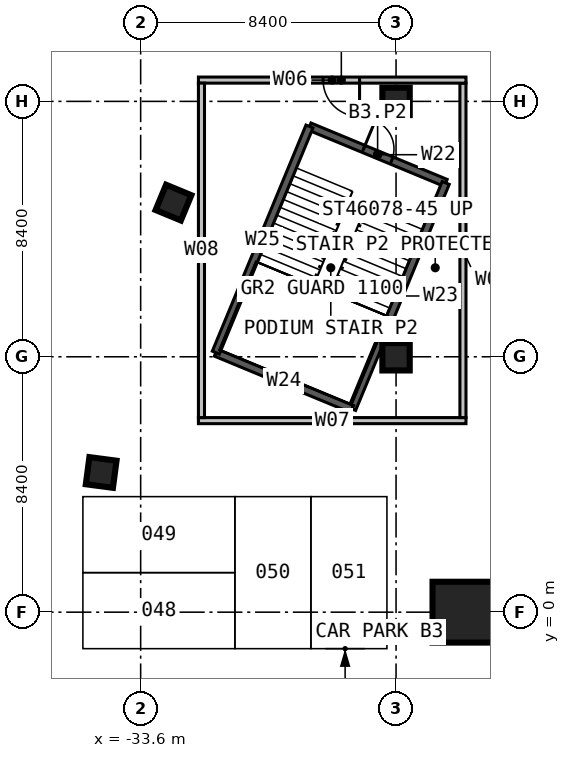
"""IFC4 building model, lengths in metres.
Left out: names, types, materials, properties, quantities, classifications, styles, units other than length and angle.
Written with IfcOpenShell. Run it as: python <this file> out.ifc"""

import sys

from ifc_helpers import new_model, si_unit, direction, frame, frame_2d, origin, origin_2d, place, context, subcontext, project, spatial, rectangle, hollow_rectangle, extrude, element, fill, save


model = new_model("IFC4")
c1 = context("Model", 3, precision=1e-05, world=origin(), true_north=direction((0.0, 1.0)))
c2 = subcontext(c1, "Body", "Model", "MODEL_VIEW")
j1 = project(units=[si_unit("LENGTHUNIT", "METRE"), si_unit("PLANEANGLEUNIT", "RADIAN")], contexts=[c1])
p1 = place(None, origin())
s1 = spatial("IfcSite", under=j1, at=p1, CompositionType="ELEMENT")
p2 = place(p1, origin())
s2 = spatial("IfcBuilding", under=s1, at=p2, CompositionType="ELEMENT")
p3 = place(p2, frame((0.0, 0.0, -13.5)))
s3 = spatial("IfcBuildingStorey", under=s2, at=p3, CompositionType="ELEMENT", Elevation=-13.5)
for number, where, z_axis, x_axis in (
    (1, (-25.2, 8.4, 0.0), (0.0, 0.0, 1.0), (1.0, 0.0, 0.0)),
    (2, (-25.2, 16.8, 0.0), (0.0, 0.0, 1.0), (1.0, 0.0, 0.0)),
    (3, (-32.521, 13.47, 0.0), (0.0, 0.0, 1.0), (-0.924, 0.383, 0.0)),
    (4, (-34.899, 4.594, 0.0), (0.0, 0.0, 1.0), (-0.991, 0.131, 0.0)),
):
    element("IfcColumn", number, at=place(p3, frame(where, z_axis=z_axis, x_axis=x_axis)), inside=s3, PredefinedType="COLUMN", context=c2, shape_type="SweptSolid", body=[
        extrude(rectangle(XDim=0.9, YDim=0.9, at=origin_2d()), origin(), (0.0, 0.0, 1.0), 4.5),
    ])
p4 = place(p3, frame((-23.0, 0.0, 0.0), z_axis=(0.0, 0.0, 1.0), x_axis=(-1.0, 0.0, 0.0)))
e5 = element("IfcColumn", 5, at=p4, inside=s3, PredefinedType="COLUMN", context=c2, shape_type="SweptSolid", body=[
    extrude(hollow_rectangle(XDim=2.0, YDim=2.0, WallThickness=0.24, at=origin_2d()), origin(), (0.0, 0.0, 1.0), 4.5),
])
p5 = place(p3, frame((-28.047, 15.974, 0.0), z_axis=(0.0, 0.0, 1.0), x_axis=(0.923862828997, -0.382723755727, 0.0)))
e6 = element("IfcWall", 6, at=p5, inside=s3, PredefinedType="SOLIDWALL", context=c2, shape_type="SweptSolid", body=[
    extrude(rectangle(XDim=4.85, YDim=0.25, at=frame_2d((2.425, 0.0))), origin(), (0.0, 0.0, 1.0), 4.5),
])
p6 = place(p5, frame((1.925, 0.0, 0.0)))
e7 = element("IfcOpeningElement", 7, at=p6, cuts=e6, PredefinedType="OPENING", context=c2, shape_type="SweptSolid", body=[
    extrude(rectangle(XDim=1.0, YDim=2.2, at=frame_2d((0.5, 1.1))), frame((0.0, 0.135, 0.0), z_axis=(0.0, -1.0, 0.0), x_axis=(1.0, 0.0, 0.0)), (0.0, 0.0, 1.0), 0.27),
])
p7 = place(p3, frame((-23.566, 14.118, 0.0), z_axis=(0.0, 0.0, 1.0), x_axis=(-0.382689294869, -0.923877104161, 0.0)))
e8 = element("IfcWall", 8, at=p7, inside=s3, PredefinedType="SOLIDWALL", context=c2, shape_type="SweptSolid", body=[
    extrude(rectangle(XDim=8.05, YDim=0.25, at=frame_2d((4.025, 0.0))), origin(), (0.0, 0.0, 1.0), 4.5),
])
p8 = place(p3, frame((-26.647, 6.681, 0.0), z_axis=(0.0, 0.0, 1.0), x_axis=(-0.923880627248, 0.382680789426, 0.0)))
e9 = element("IfcWall", 9, at=p8, inside=s3, PredefinedType="SOLIDWALL", context=c2, shape_type="SweptSolid", body=[
    extrude(rectangle(XDim=4.85, YDim=0.25, at=frame_2d((2.425, 0.0))), origin(), (0.0, 0.0, 1.0), 4.5),
])
p9 = place(p3, frame((-31.127, 8.537, 0.0), z_axis=(0.0, 0.0, 1.0), x_axis=(0.382678572144, 0.923881545666, 0.0)))
e10 = element("IfcWall", 10, at=p9, inside=s3, PredefinedType="SOLIDWALL", context=c2, shape_type="SweptSolid", body=[
    extrude(rectangle(XDim=8.05, YDim=0.25, at=frame_2d((4.025, 0.0))), origin(), (0.0, 0.0, 1.0), 4.5),
])
p10 = place(p3, frame((-31.7, 6.3, 0.0), z_axis=(0.0, 0.0, 1.0), x_axis=(1.0, 0.0, 0.0)))
e11 = element("IfcWall", 11, at=p10, inside=s3, PredefinedType="PARTITIONING", context=c2, shape_type="SweptSolid", body=[
    extrude(rectangle(XDim=8.8, YDim=0.2, at=frame_2d((4.4, 0.0))), origin(), (0.0, 0.0, 1.0), 4.2),
])
p11 = place(p3, frame((-23.0, 6.4, 0.0), z_axis=(0.0, 0.0, 1.0), x_axis=(0.0, 1.0, 0.0)))
e12 = element("IfcWall", 12, at=p11, inside=s3, PredefinedType="PARTITIONING", context=c2, shape_type="SweptSolid", body=[
    extrude(rectangle(XDim=11.0, YDim=0.2, at=frame_2d((5.5, 0.0))), origin(), (0.0, 0.0, 1.0), 4.2),
])
p12 = place(p3, frame((-22.9, 17.5, 0.0), z_axis=(0.0, 0.0, 1.0), x_axis=(-1.0, 0.0, 0.0)))
e13 = element("IfcWall", 13, at=p12, inside=s3, PredefinedType="PARTITIONING", context=c2, shape_type="SweptSolid", body=[
    extrude(rectangle(XDim=8.8, YDim=0.2, at=frame_2d((4.4, 0.0))), origin(), (0.0, 0.0, 1.0), 4.2),
])
p13 = place(p12, frame((3.5, 0.0, 0.0)))
e14 = element("IfcOpeningElement", 14, at=p13, cuts=e13, PredefinedType="OPENING", context=c2, shape_type="SweptSolid", body=[
    extrude(rectangle(XDim=1.2, YDim=2.2, at=frame_2d((0.6, 1.1))), frame((0.0, 0.11, 0.0), z_axis=(0.0, -1.0, 0.0), x_axis=(1.0, 0.0, 0.0)), (0.0, 0.0, 1.0), 0.22),
])
p14 = place(p3, frame((-31.6, 17.4, 0.0), z_axis=(0.0, 0.0, 1.0), x_axis=(0.0, -1.0, 0.0)))
e15 = element("IfcWall", 15, at=p14, inside=s3, PredefinedType="PARTITIONING", context=c2, shape_type="SweptSolid", body=[
    extrude(rectangle(XDim=11.0, YDim=0.2, at=frame_2d((5.5, 0.0))), origin(), (0.0, 0.0, 1.0), 4.2),
])
p15 = place(p6, origin())
e16 = element("IfcDoor", 16, at=p15, inside=s3, OperationType="SINGLE_SWING_LEFT", PredefinedType="DOOR", context=c2, shape_type="SweptSolid", body=[
    extrude(rectangle(XDim=1.0, YDim=2.2, at=frame_2d((0.5, 1.1))), frame((0.0, 0.025, 0.0), z_axis=(0.0, -1.0, 0.0), x_axis=(1.0, 0.0, 0.0)), (0.0, 0.0, 1.0), 0.05),
])
fill(e7, e16)
p16 = place(p13, origin())
e17 = element("IfcDoor", 17, at=p16, inside=s3, OperationType="SINGLE_SWING_LEFT", PredefinedType="DOOR", context=c2, shape_type="SweptSolid", body=[
    extrude(rectangle(XDim=1.2, YDim=2.2, at=frame_2d((0.6, 1.1))), frame((0.0, 0.025, 0.0), z_axis=(0.0, -1.0, 0.0), x_axis=(1.0, 0.0, 0.0)), (0.0, 0.0, 1.0), 0.05),
])
fill(e14, e17)
save(model, sys.argv[1])
